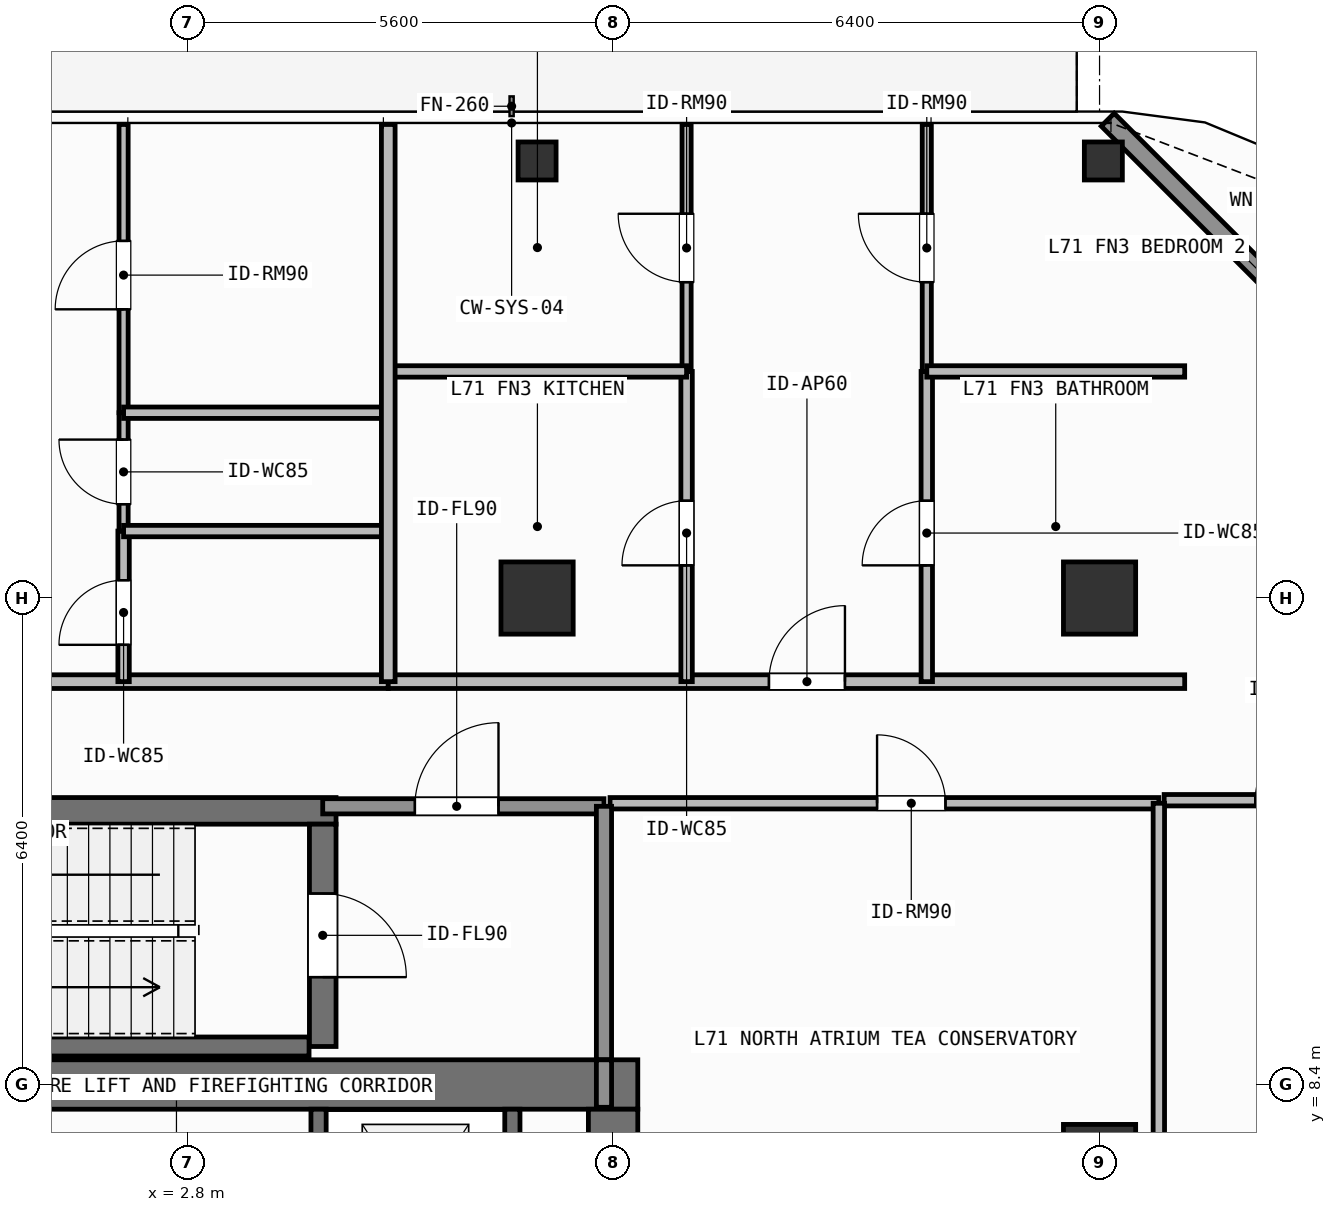
"""IFC4 building model, lengths in metres.
Left out: names, types, materials, properties, quantities, classifications, styles, units other than length and angle.
Written with IfcOpenShell. Run it as: python <this file> out.ifc"""

import sys

from ifc_helpers import new_model, si_unit, direction, frame, frame_2d, origin, origin_2d, place, context, subcontext, project, spatial, rectangle, hollow_rectangle, extrude, element, fill, save


model = new_model("IFC4")
c1 = context("Model", 3, precision=1e-05, world=origin(), true_north=direction((0.0, 1.0)))
c2 = subcontext(c1, "Body", "Model", "MODEL_VIEW")
j1 = project(units=[si_unit("LENGTHUNIT", "METRE"), si_unit("PLANEANGLEUNIT", "RADIAN")], contexts=[c1])
p1 = place(None, origin())
s1 = spatial("IfcSite", under=j1, at=p1, CompositionType="ELEMENT")
p2 = place(p1, origin())
s2 = spatial("IfcBuilding", under=s1, at=p2, CompositionType="ELEMENT")
p3 = place(p2, frame((0.0, 0.0, 289.8)))
s3 = spatial("IfcBuildingStorey", under=s2, at=p3, CompositionType="ELEMENT", Elevation=289.8)
p4 = place(p3, frame((-7.55, 8.4, 0.0), z_axis=(0.0, 0.0, 1.0), x_axis=(1.0, 0.0, 0.0)))
e1 = element("IfcWall", 1, at=p4, inside=s3, PredefinedType="SHEAR", context=c2, shape_type="SweptSolid", body=[
    extrude(rectangle(XDim=16.275, YDim=0.65, at=frame_2d((8.138, 0.0))), origin(), (0.0, 0.0, 1.0), 3.9),
])
p5 = place(p3, frame((8.4, 5.825, 0.0), z_axis=(0.0, 0.0, 1.0), x_axis=(0.0, 1.0, 0.0)))
e2 = element("IfcWall", 2, at=p5, inside=s3, PredefinedType="SHEAR", context=c2, shape_type="SweptSolid", body=[
    extrude(rectangle(XDim=2.25, YDim=0.65, at=frame_2d((1.125, 0.0))), origin(), (0.0, 0.0, 1.0), 3.9),
])
p6 = place(p3, frame((-2.555, 12.0, 0.0), z_axis=(0.0, 0.0, 1.0), x_axis=(1.0, 0.0, 0.0)))
e3 = element("IfcWall", 3, at=p6, inside=s3, PredefinedType="SHEAR", context=c2, shape_type="SweptSolid", body=[
    extrude(rectangle(XDim=7.31, YDim=0.35, at=frame_2d((3.655, 0.0))), origin(), (0.0, 0.0, 1.0), 3.9),
])
p7 = place(p3, frame((-2.2, 8.9, 0.0), z_axis=(0.0, 0.0, 1.0), x_axis=(1.0, 0.0, 0.0)))
e4 = element("IfcWall", 4, at=p7, inside=s3, PredefinedType="SHEAR", context=c2, shape_type="SweptSolid", body=[
    extrude(rectangle(XDim=6.6, YDim=0.25, at=frame_2d((3.3, 0.0))), origin(), (0.0, 0.0, 1.0), 3.9),
])
p8 = place(p3, frame((4.58, 11.825, 0.0), z_axis=(0.0, 0.0, 1.0), x_axis=(0.0, -1.0, 0.0)))
e5 = element("IfcWall", 5, at=p8, inside=s3, PredefinedType="SHEAR", context=c2, shape_type="SweptSolid", body=[
    extrude(rectangle(XDim=2.925, YDim=0.35, at=frame_2d((1.462, 0.0))), origin(), (0.0, 0.0, 1.0), 3.9),
])
p9 = place(p8, frame((0.913, 0.0, 0.0)))
e6 = element("IfcOpeningElement", 6, at=p9, cuts=e5, PredefinedType="OPENING", context=c2, shape_type="SweptSolid", body=[
    extrude(rectangle(XDim=1.1, YDim=2.15, at=frame_2d((0.55, 1.075))), frame((0.0, 0.185, 0.0), z_axis=(0.0, -1.0, 0.0), x_axis=(1.0, 0.0, 0.0)), (0.0, 0.0, 1.0), 0.37),
])
for number, where, z_axis, x_axis in (
    (7, (7.4, 14.8, 0.0), (0.0, 0.0, 1.0), (1.0, 0.0, 0.0)),
    (8, (14.8, 14.8, 0.0), (0.0, 0.0, 1.0), (1.0, 0.0, 0.0)),
    (9, (14.8, 7.4, 0.0), (0.0, 0.0, 1.0), (1.0, 0.0, 0.0)),
):
    element("IfcColumn", number, at=place(p3, frame(where, z_axis=z_axis, x_axis=x_axis)), inside=s3, PredefinedType="COLUMN", context=c2, shape_type="SweptSolid", body=[
        extrude(rectangle(XDim=0.95, YDim=0.95, at=origin_2d()), origin(), (0.0, 0.0, 1.0), 3.9),
    ])
for number, where, z_axis, x_axis in (
    (10, (14.85, 20.55, 0.0), (0.0, 0.0, 1.0), (1.0, 0.0, 0.0)),
    (11, (7.4, 20.55, 0.0), (0.0, 0.0, 1.0), (1.0, 0.0, 0.0)),
):
    element("IfcColumn", number, at=place(p3, frame(where, z_axis=z_axis, x_axis=x_axis)), inside=s3, PredefinedType="COLUMN", context=c2, shape_type="SweptSolid", body=[
        extrude(hollow_rectangle(XDim=0.5, YDim=0.5, WallThickness=0.025, at=origin_2d()), origin(), (0.0, 0.0, 1.0), 3.9),
    ])
p10 = place(p3, frame((14.908, 21.092, 0.0), z_axis=(0.0, 0.0, 1.0), x_axis=(0.707106781187, -0.707106781187, 0.0)))
e12 = element("IfcWall", 12, at=p10, inside=s3, PredefinedType="SOLIDWALL", context=c2, shape_type="SweptSolid", body=[
    extrude(rectangle(XDim=6.059, YDim=0.24, at=frame_2d((3.03, 0.0))), origin(), (0.0, 0.0, 1.0), 3.68),
])
p11 = place(p10, frame((2.28, 0.0, 0.8)))
e13 = element("IfcOpeningElement", 13, at=p11, cuts=e12, PredefinedType="OPENING", context=c2, shape_type="SweptSolid", body=[
    extrude(rectangle(XDim=1.5, YDim=1.85, at=frame_2d((0.75, 0.925))), frame((0.0, 0.13, 0.0), z_axis=(0.0, -1.0, 0.0), x_axis=(1.0, 0.0, 0.0)), (0.0, 0.0, 1.0), 0.26),
])
p12 = place(p3, frame((4.525, 5.825, 0.0), z_axis=(0.0, 0.0, 1.0), x_axis=(0.0, 1.0, 0.0)))
e14 = element("IfcWall", 14, at=p12, inside=s3, PredefinedType="SHEAR", context=c2, shape_type="SweptSolid", body=[
    extrude(rectangle(XDim=2.25, YDim=0.2, at=frame_2d((1.125, 0.0))), origin(), (0.0, 0.0, 1.0), 3.68),
])
p13 = place(p12, frame((0.425, 0.0, 0.0)))
e15 = element("IfcOpeningElement", 15, at=p13, cuts=e14, PredefinedType="OPENING", context=c2, shape_type="SweptSolid", body=[
    extrude(rectangle(XDim=1.1, YDim=2.2, at=frame_2d((0.55, 1.1))), frame((0.0, 0.11, 0.0), z_axis=(0.0, -1.0, 0.0), x_axis=(1.0, 0.0, 0.0)), (0.0, 0.0, 1.0), 0.22),
])
p14 = place(p3, frame((7.075, 5.825, 0.0), z_axis=(0.0, 0.0, 1.0), x_axis=(0.0, 1.0, 0.0)))
e16 = element("IfcWall", 16, at=p14, inside=s3, PredefinedType="SHEAR", context=c2, shape_type="SweptSolid", body=[
    extrude(rectangle(XDim=2.25, YDim=0.2, at=frame_2d((1.125, 0.0))), origin(), (0.0, 0.0, 1.0), 3.68),
])
p15 = place(p3, frame((4.58, 12.06, 0.0), z_axis=(0.0, 0.0, 1.0), x_axis=(1.0, 0.0, 0.0)))
e17 = element("IfcWall", 17, at=p15, inside=s3, PredefinedType="SOLIDWALL", context=c2, shape_type="SweptSolid", body=[
    extrude(rectangle(XDim=3.7, YDim=0.2, at=frame_2d((1.85, 0.0))), origin(), (0.0, 0.0, 1.0), 3.68),
])
p16 = place(p15, frame((1.212, 0.0, 0.0)))
e18 = element("IfcOpeningElement", 18, at=p16, cuts=e17, PredefinedType="OPENING", context=c2, shape_type="SweptSolid", body=[
    extrude(rectangle(XDim=1.1, YDim=2.15, at=frame_2d((0.55, 1.075))), frame((0.0, 0.11, 0.0), z_axis=(0.0, -1.0, 0.0), x_axis=(1.0, 0.0, 0.0)), (0.0, 0.0, 1.0), 0.22),
])
p17 = place(p3, frame((8.36, 12.1, 0.0), z_axis=(0.0, 0.0, 1.0), x_axis=(1.0, 0.0, 0.0)))
e19 = element("IfcWall", 19, at=p17, inside=s3, PredefinedType="PARTITIONING", context=c2, shape_type="SweptSolid", body=[
    extrude(rectangle(XDim=7.22, YDim=0.15, at=frame_2d((3.61, 0.0))), origin(), (0.0, 0.0, 1.0), 3.68),
])
p18 = place(p17, frame((3.513, 0.0, 0.0)))
e20 = element("IfcOpeningElement", 20, at=p18, cuts=e19, PredefinedType="OPENING", context=c2, shape_type="SweptSolid", body=[
    extrude(rectangle(XDim=0.9, YDim=2.1, at=frame_2d((0.45, 1.05))), frame((0.0, 0.085, 0.0), z_axis=(0.0, -1.0, 0.0), x_axis=(1.0, 0.0, 0.0)), (0.0, 0.0, 1.0), 0.17),
])
p19 = place(p3, frame((-10.393, 13.7, 0.0), z_axis=(0.0, 0.0, 1.0), x_axis=(1.0, 0.0, 0.0)))
e21 = element("IfcWall", 21, at=p19, inside=s3, PredefinedType="PARTITIONING", context=c2, shape_type="SweptSolid", body=[
    extrude(rectangle(XDim=15.835, YDim=0.18, at=frame_2d((7.917, 0.0))), origin(), (0.0, 0.0, 1.0), 3.68),
])
p20 = place(p19, frame((8.224, 0.0, 0.0)))
e22 = element("IfcOpeningElement", 22, at=p20, cuts=e21, PredefinedType="OPENING", context=c2, shape_type="SweptSolid", body=[
    extrude(rectangle(XDim=1.0, YDim=2.2, at=frame_2d((0.5, 1.1))), frame((0.0, 0.1, 0.0), z_axis=(0.0, -1.0, 0.0), x_axis=(1.0, 0.0, 0.0)), (0.0, 0.0, 1.0), 0.2),
])
p21 = place(p3, frame((1.96, 13.7, 0.0), z_axis=(0.0, 0.0, 1.0), x_axis=(0.0, 1.0, 0.0)))
e23 = element("IfcWall", 23, at=p21, inside=s3, PredefinedType="PARTITIONING", context=c2, shape_type="SweptSolid", body=[
    extrude(rectangle(XDim=1.981, YDim=0.15, at=frame_2d((0.99, 0.0))), origin(), (0.0, 0.0, 1.0), 3.68),
])
p22 = place(p21, frame((0.484, 0.0, 0.0)))
e24 = element("IfcOpeningElement", 24, at=p22, cuts=e23, PredefinedType="OPENING", context=c2, shape_type="SweptSolid", body=[
    extrude(rectangle(XDim=0.85, YDim=2.1, at=frame_2d((0.425, 1.05))), frame((0.0, 0.085, 0.0), z_axis=(0.0, -1.0, 0.0), x_axis=(1.0, 0.0, 0.0)), (0.0, 0.0, 1.0), 0.17),
])
p23 = place(p3, frame((1.96, 15.681, 0.0), z_axis=(0.0, 0.0, 1.0), x_axis=(0.0, 1.0, 0.0)))
e25 = element("IfcWall", 25, at=p23, inside=s3, PredefinedType="PARTITIONING", context=c2, shape_type="SweptSolid", body=[
    extrude(rectangle(XDim=1.557, YDim=0.12, at=frame_2d((0.779, 0.0))), origin(), (0.0, 0.0, 1.0), 3.68),
])
p24 = place(p23, frame((0.354, 0.0, 0.0)))
e26 = element("IfcOpeningElement", 26, at=p24, cuts=e25, PredefinedType="OPENING", context=c2, shape_type="SweptSolid", body=[
    extrude(rectangle(XDim=0.85, YDim=2.1, at=frame_2d((0.425, 1.05))), frame((0.0, 0.07, 0.0), z_axis=(0.0, -1.0, 0.0), x_axis=(1.0, 0.0, 0.0)), (0.0, 0.0, 1.0), 0.14),
])
p25 = place(p3, frame((1.96, 17.238, 0.0), z_axis=(0.0, 0.0, 1.0), x_axis=(0.0, 1.0, 0.0)))
e27 = element("IfcWall", 27, at=p25, inside=s3, PredefinedType="PARTITIONING", context=c2, shape_type="SweptSolid", body=[
    extrude(rectangle(XDim=3.792, YDim=0.12, at=frame_2d((1.896, 0.0))), origin(), (0.0, 0.0, 1.0), 3.68),
])
p26 = place(p25, frame((1.36, 0.0, 0.0)))
e28 = element("IfcOpeningElement", 28, at=p26, cuts=e27, PredefinedType="OPENING", context=c2, shape_type="SweptSolid", body=[
    extrude(rectangle(XDim=0.9, YDim=2.1, at=frame_2d((0.45, 1.05))), frame((0.0, 0.07, 0.0), z_axis=(0.0, -1.0, 0.0), x_axis=(1.0, 0.0, 0.0)), (0.0, 0.0, 1.0), 0.14),
])
p27 = place(p3, frame((5.442, 13.7, 0.0), z_axis=(0.0, 0.0, 1.0), x_axis=(1.0, 0.0, 0.0)))
e29 = element("IfcWall", 29, at=p27, inside=s3, PredefinedType="PARTITIONING", context=c2, shape_type="SweptSolid", body=[
    extrude(rectangle(XDim=10.478, YDim=0.18, at=frame_2d((5.239, 0.0))), origin(), (0.0, 0.0, 1.0), 3.68),
])
p28 = place(p27, frame((5.008, 0.0, 0.0)))
e30 = element("IfcOpeningElement", 30, at=p28, cuts=e29, PredefinedType="OPENING", context=c2, shape_type="SweptSolid", body=[
    extrude(rectangle(XDim=1.0, YDim=2.2, at=frame_2d((0.5, 1.1))), frame((0.0, 0.1, 0.0), z_axis=(0.0, -1.0, 0.0), x_axis=(1.0, 0.0, 0.0)), (0.0, 0.0, 1.0), 0.2),
])
p29 = place(p3, frame((9.367, 13.7, 0.0), z_axis=(0.0, 0.0, 1.0), x_axis=(0.0, 1.0, 0.0)))
e31 = element("IfcWall", 31, at=p29, inside=s3, PredefinedType="PARTITIONING", context=c2, shape_type="SweptSolid", body=[
    extrude(rectangle(XDim=4.081, YDim=0.15, at=frame_2d((2.041, 0.0))), origin(), (0.0, 0.0, 1.0), 3.68),
])
p30 = place(p29, frame((1.53, 0.0, 0.0)))
e32 = element("IfcOpeningElement", 32, at=p30, cuts=e31, PredefinedType="OPENING", context=c2, shape_type="SweptSolid", body=[
    extrude(rectangle(XDim=0.85, YDim=2.1, at=frame_2d((0.425, 1.05))), frame((0.0, 0.085, 0.0), z_axis=(0.0, -1.0, 0.0), x_axis=(1.0, 0.0, 0.0)), (0.0, 0.0, 1.0), 0.17),
])
p31 = place(p3, frame((9.367, 17.781, 0.0), z_axis=(0.0, 0.0, 1.0), x_axis=(0.0, 1.0, 0.0)))
e33 = element("IfcWall", 33, at=p31, inside=s3, PredefinedType="PARTITIONING", context=c2, shape_type="SweptSolid", body=[
    extrude(rectangle(XDim=3.249, YDim=0.12, at=frame_2d((1.625, 0.0))), origin(), (0.0, 0.0, 1.0), 3.68),
])
p32 = place(p31, frame((1.175, 0.0, 0.0)))
e34 = element("IfcOpeningElement", 34, at=p32, cuts=e33, PredefinedType="OPENING", context=c2, shape_type="SweptSolid", body=[
    extrude(rectangle(XDim=0.9, YDim=2.1, at=frame_2d((0.45, 1.05))), frame((0.0, 0.07, 0.0), z_axis=(0.0, -1.0, 0.0), x_axis=(1.0, 0.0, 0.0)), (0.0, 0.0, 1.0), 0.14),
])
p33 = place(p3, frame((12.527, 13.7, 0.0), z_axis=(0.0, 0.0, 1.0), x_axis=(0.0, 1.0, 0.0)))
e35 = element("IfcWall", 35, at=p33, inside=s3, PredefinedType="PARTITIONING", context=c2, shape_type="SweptSolid", body=[
    extrude(rectangle(XDim=4.081, YDim=0.15, at=frame_2d((2.041, 0.0))), origin(), (0.0, 0.0, 1.0), 3.68),
])
p34 = place(p33, frame((1.53, 0.0, 0.0)))
e36 = element("IfcOpeningElement", 36, at=p34, cuts=e35, PredefinedType="OPENING", context=c2, shape_type="SweptSolid", body=[
    extrude(rectangle(XDim=0.85, YDim=2.1, at=frame_2d((0.425, 1.05))), frame((0.0, 0.085, 0.0), z_axis=(0.0, -1.0, 0.0), x_axis=(1.0, 0.0, 0.0)), (0.0, 0.0, 1.0), 0.17),
])
p35 = place(p3, frame((12.527, 17.781, 0.0), z_axis=(0.0, 0.0, 1.0), x_axis=(0.0, 1.0, 0.0)))
e37 = element("IfcWall", 37, at=p35, inside=s3, PredefinedType="PARTITIONING", context=c2, shape_type="SweptSolid", body=[
    extrude(rectangle(XDim=3.249, YDim=0.12, at=frame_2d((1.625, 0.0))), origin(), (0.0, 0.0, 1.0), 3.68),
])
p36 = place(p35, frame((1.175, 0.0, 0.0)))
e38 = element("IfcOpeningElement", 38, at=p36, cuts=e37, PredefinedType="OPENING", context=c2, shape_type="SweptSolid", body=[
    extrude(rectangle(XDim=0.9, YDim=2.1, at=frame_2d((0.45, 1.05))), frame((0.0, 0.07, 0.0), z_axis=(0.0, -1.0, 0.0), x_axis=(1.0, 0.0, 0.0)), (0.0, 0.0, 1.0), 0.14),
])
p37 = place(p3, frame((15.65, 12.14, 0.0), z_axis=(0.0, 0.0, 1.0), x_axis=(1.0, 0.0, 0.0)))
e39 = element("IfcWall", 39, at=p37, inside=s3, PredefinedType="PARTITIONING", context=c2, shape_type="SweptSolid", body=[
    extrude(rectangle(XDim=3.47, YDim=0.15, at=frame_2d((1.735, 0.0))), origin(), (0.0, 0.0, 1.0), 3.68),
])
p38 = place(p37, frame((1.198, 0.0, 0.0)))
e40 = element("IfcOpeningElement", 40, at=p38, cuts=e39, PredefinedType="OPENING", context=c2, shape_type="SweptSolid", body=[
    extrude(rectangle(XDim=0.9, YDim=2.1, at=frame_2d((0.45, 1.05))), frame((0.0, 0.085, 0.0), z_axis=(0.0, -1.0, 0.0), x_axis=(1.0, 0.0, 0.0)), (0.0, 0.0, 1.0), 0.17),
])
p39 = place(p3, frame((8.28, 8.725, 0.0), z_axis=(0.0, 0.0, 1.0), x_axis=(0.0, 1.0, 0.0)))
e41 = element("IfcWall", 41, at=p39, inside=s3, PredefinedType="SOLIDWALL", context=c2, shape_type="SweptSolid", body=[
    extrude(rectangle(XDim=3.335, YDim=0.2, at=frame_2d((1.667, 0.0))), origin(), (0.0, 0.0, 1.0), 3.68),
])
p40 = place(p3, frame((8.28, 8.1, 0.0), z_axis=(0.0, 0.0, 1.0), x_axis=(0.0, 1.0, 0.0)))
e42 = element("IfcWall", 42, at=p40, inside=s3, PredefinedType="SOLIDWALL", context=c2, shape_type="SweptSolid", body=[
    extrude(rectangle(XDim=0.625, YDim=0.2, at=frame_2d((0.312, 0.0))), origin(), (0.0, 0.0, 1.0), 3.68),
])
p41 = place(p3, frame((15.58, 5.85, 0.0), z_axis=(0.0, 0.0, 1.0), x_axis=(0.0, 1.0, 0.0)))
e43 = element("IfcWall", 43, at=p41, inside=s3, PredefinedType="PARTITIONING", context=c2, shape_type="SweptSolid", body=[
    extrude(rectangle(XDim=6.25, YDim=0.15, at=frame_2d((3.125, 0.0))), origin(), (0.0, 0.0, 1.0), 3.68),
])
for number, where, z_axis, x_axis in (
    (44, (1.96, 15.681, 0.0), (0.0, 0.0, 1.0), (1.0, 0.0, 0.0)),
    (45, (1.96, 17.238, 0.0), (0.0, 0.0, 1.0), (1.0, 0.0, 0.0)),
):
    element("IfcWall", number, at=place(p3, frame(where, z_axis=z_axis, x_axis=x_axis)), inside=s3, PredefinedType="PARTITIONING", context=c2, shape_type="SweptSolid", body=[
        extrude(rectangle(XDim=3.482, YDim=0.15, at=frame_2d((1.741, 0.0))), origin(), (0.0, 0.0, 1.0), 3.68),
    ])
p42 = place(p3, frame((5.442, 17.781, 0.0), z_axis=(0.0, 0.0, 1.0), x_axis=(1.0, 0.0, 0.0)))
e46 = element("IfcWall", 46, at=p42, inside=s3, PredefinedType="PARTITIONING", context=c2, shape_type="SweptSolid", body=[
    extrude(rectangle(XDim=3.925, YDim=0.15, at=frame_2d((1.962, 0.0))), origin(), (0.0, 0.0, 1.0), 3.68),
])
p43 = place(p3, frame((12.527, 17.781, 0.0), z_axis=(0.0, 0.0, 1.0), x_axis=(1.0, 0.0, 0.0)))
e47 = element("IfcWall", 47, at=p43, inside=s3, PredefinedType="PARTITIONING", context=c2, shape_type="SweptSolid", body=[
    extrude(rectangle(XDim=3.393, YDim=0.15, at=frame_2d((1.696, 0.0))), origin(), (0.0, 0.0, 1.0), 3.68),
])
p44 = place(p3, frame((5.442, 13.7, 0.0), z_axis=(0.0, 0.0, 1.0), x_axis=(0.0, 1.0, 0.0)))
e48 = element("IfcWall", 48, at=p44, inside=s3, PredefinedType="PARTITIONING", context=c2, shape_type="SweptSolid", body=[
    extrude(rectangle(XDim=7.33, YDim=0.18, at=frame_2d((3.665, 0.0))), origin(), (0.0, 0.0, 1.0), 3.68),
])
p45 = place(p11, origin())
e49 = element("IfcWindow", 49, at=p45, inside=s3, PartitioningType="SINGLE_PANEL", PredefinedType="WINDOW", context=c2, shape_type="SweptSolid", body=[
    extrude(rectangle(XDim=1.5, YDim=1.85, at=frame_2d((0.75, 0.925))), frame((0.0, 0.03, 0.0), z_axis=(0.0, -1.0, 0.0), x_axis=(1.0, 0.0, 0.0)), (0.0, 0.0, 1.0), 0.06),
])
fill(e13, e49)
p46 = place(p9, origin())
e50 = element("IfcDoor", 50, at=p46, inside=s3, OperationType="SINGLE_SWING_RIGHT", PredefinedType="DOOR", context=c2, shape_type="SweptSolid", body=[
    extrude(rectangle(XDim=1.1, YDim=2.15, at=frame_2d((0.55, 1.075))), frame((0.0, 0.025, 0.0), z_axis=(0.0, -1.0, 0.0), x_axis=(1.0, 0.0, 0.0)), (0.0, 0.0, 1.0), 0.05),
])
fill(e6, e50)
p47 = place(p16, origin())
e51 = element("IfcDoor", 51, at=p47, inside=s3, OperationType="SINGLE_SWING_RIGHT", PredefinedType="DOOR", context=c2, shape_type="SweptSolid", body=[
    extrude(rectangle(XDim=1.1, YDim=2.15, at=frame_2d((0.55, 1.075))), frame((0.0, 0.025, 0.0), z_axis=(0.0, -1.0, 0.0), x_axis=(1.0, 0.0, 0.0)), (0.0, 0.0, 1.0), 0.05),
])
fill(e18, e51)
p48 = place(p18, origin())
e52 = element("IfcDoor", 52, at=p48, inside=s3, OperationType="SINGLE_SWING_LEFT", PredefinedType="DOOR", context=c2, shape_type="SweptSolid", body=[
    extrude(rectangle(XDim=0.9, YDim=2.1, at=frame_2d((0.45, 1.05))), frame((0.0, 0.025, 0.0), z_axis=(0.0, -1.0, 0.0), x_axis=(1.0, 0.0, 0.0)), (0.0, 0.0, 1.0), 0.05),
])
fill(e20, e52)
p49 = place(p22, origin())
e53 = element("IfcDoor", 53, at=p49, inside=s3, OperationType="SINGLE_SWING_LEFT", PredefinedType="DOOR", context=c2, shape_type="SweptSolid", body=[
    extrude(rectangle(XDim=0.85, YDim=2.1, at=frame_2d((0.425, 1.05))), frame((0.0, 0.025, 0.0), z_axis=(0.0, -1.0, 0.0), x_axis=(1.0, 0.0, 0.0)), (0.0, 0.0, 1.0), 0.05),
])
fill(e24, e53)
p50 = place(p24, origin())
e54 = element("IfcDoor", 54, at=p50, inside=s3, OperationType="SINGLE_SWING_RIGHT", PredefinedType="DOOR", context=c2, shape_type="SweptSolid", body=[
    extrude(rectangle(XDim=0.85, YDim=2.1, at=frame_2d((0.425, 1.05))), frame((0.0, 0.025, 0.0), z_axis=(0.0, -1.0, 0.0), x_axis=(1.0, 0.0, 0.0)), (0.0, 0.0, 1.0), 0.05),
])
fill(e26, e54)
p51 = place(p26, origin())
e55 = element("IfcDoor", 55, at=p51, inside=s3, OperationType="SINGLE_SWING_LEFT", PredefinedType="DOOR", context=c2, shape_type="SweptSolid", body=[
    extrude(rectangle(XDim=0.9, YDim=2.1, at=frame_2d((0.45, 1.05))), frame((0.0, 0.025, 0.0), z_axis=(0.0, -1.0, 0.0), x_axis=(1.0, 0.0, 0.0)), (0.0, 0.0, 1.0), 0.05),
])
fill(e28, e55)
p52 = place(p28, origin())
e56 = element("IfcDoor", 56, at=p52, inside=s3, OperationType="SINGLE_SWING_RIGHT", PredefinedType="DOOR", context=c2, shape_type="SweptSolid", body=[
    extrude(rectangle(XDim=1.0, YDim=2.2, at=frame_2d((0.5, 1.1))), frame((0.0, 0.025, 0.0), z_axis=(0.0, -1.0, 0.0), x_axis=(1.0, 0.0, 0.0)), (0.0, 0.0, 1.0), 0.05),
])
fill(e30, e56)
p53 = place(p30, origin())
e57 = element("IfcDoor", 57, at=p53, inside=s3, OperationType="SINGLE_SWING_LEFT", PredefinedType="DOOR", context=c2, shape_type="SweptSolid", body=[
    extrude(rectangle(XDim=0.85, YDim=2.1, at=frame_2d((0.425, 1.05))), frame((0.0, 0.025, 0.0), z_axis=(0.0, -1.0, 0.0), x_axis=(1.0, 0.0, 0.0)), (0.0, 0.0, 1.0), 0.05),
])
fill(e32, e57)
p54 = place(p32, origin())
e58 = element("IfcDoor", 58, at=p54, inside=s3, OperationType="SINGLE_SWING_RIGHT", PredefinedType="DOOR", context=c2, shape_type="SweptSolid", body=[
    extrude(rectangle(XDim=0.9, YDim=2.1, at=frame_2d((0.45, 1.05))), frame((0.0, 0.025, 0.0), z_axis=(0.0, -1.0, 0.0), x_axis=(1.0, 0.0, 0.0)), (0.0, 0.0, 1.0), 0.05),
])
fill(e34, e58)
p55 = place(p34, origin())
e59 = element("IfcDoor", 59, at=p55, inside=s3, OperationType="SINGLE_SWING_LEFT", PredefinedType="DOOR", context=c2, shape_type="SweptSolid", body=[
    extrude(rectangle(XDim=0.85, YDim=2.1, at=frame_2d((0.425, 1.05))), frame((0.0, 0.025, 0.0), z_axis=(0.0, -1.0, 0.0), x_axis=(1.0, 0.0, 0.0)), (0.0, 0.0, 1.0), 0.05),
])
fill(e36, e59)
p56 = place(p36, origin())
e60 = element("IfcDoor", 60, at=p56, inside=s3, OperationType="SINGLE_SWING_RIGHT", PredefinedType="DOOR", context=c2, shape_type="SweptSolid", body=[
    extrude(rectangle(XDim=0.9, YDim=2.1, at=frame_2d((0.45, 1.05))), frame((0.0, 0.025, 0.0), z_axis=(0.0, -1.0, 0.0), x_axis=(1.0, 0.0, 0.0)), (0.0, 0.0, 1.0), 0.05),
])
fill(e38, e60)
p57 = place(p38, origin())
e61 = element("IfcDoor", 61, at=p57, inside=s3, OperationType="SINGLE_SWING_RIGHT", PredefinedType="DOOR", context=c2, shape_type="SweptSolid", body=[
    extrude(rectangle(XDim=0.9, YDim=2.1, at=frame_2d((0.45, 1.05))), frame((0.0, 0.025, 0.0), z_axis=(0.0, -1.0, 0.0), x_axis=(1.0, 0.0, 0.0)), (0.0, 0.0, 1.0), 0.05),
])
fill(e40, e61)
save(model, sys.argv[1])
